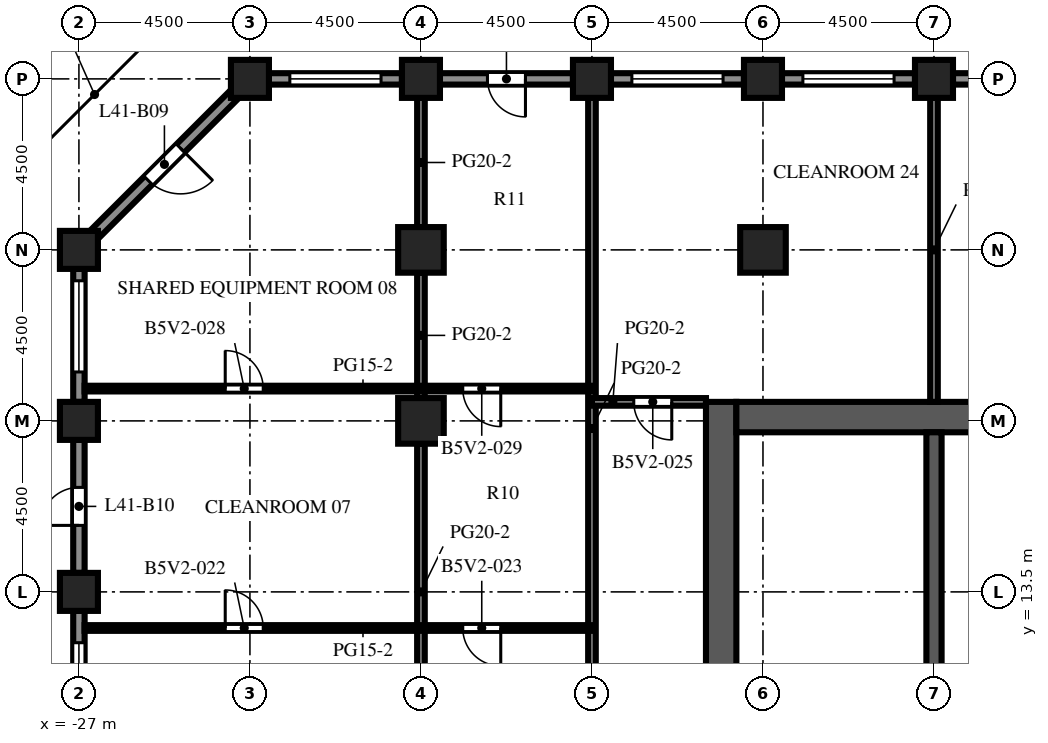
"""IFC4 building model, lengths in metres.
Left out: names, types, materials, properties, quantities, classifications, styles, units other than length and angle.
Written with IfcOpenShell. Run it as: python <this file> out.ifc"""

import sys

from ifc_helpers import new_model, si_unit, direction, frame, frame_2d, origin, origin_2d, place, context, subcontext, project, spatial, rectangle, extrude, element, fill, save


model = new_model("IFC4")
c1 = context("Model", 3, precision=1e-05, world=origin(), true_north=direction((0.0, 1.0)))
c2 = subcontext(c1, "Body", "Model", "MODEL_VIEW")
j1 = project(units=[si_unit("LENGTHUNIT", "METRE"), si_unit("PLANEANGLEUNIT", "RADIAN")], contexts=[c1])
p1 = place(None, origin())
s1 = spatial("IfcSite", under=j1, at=p1, CompositionType="ELEMENT")
p2 = place(p1, origin())
s2 = spatial("IfcBuilding", under=s1, at=p2, CompositionType="ELEMENT")
p3 = place(p2, frame((0.0, 0.0, 181.4)))
s3 = spatial("IfcBuildingStorey", under=s2, at=p3, CompositionType="ELEMENT", Elevation=181.4)
for number, where, z_axis, x_axis in (
    (1, (-27.0, 13.5, 0.0), (0.0, 0.0, 1.0), (1.0, 0.0, 0.0)),
    (2, (-27.0, 18.0, 0.0), (0.0, 0.0, 1.0), (1.0, 0.0, 0.0)),
    (3, (-27.0, 22.5, 0.0), (0.0, 0.0, 1.0), (1.0, 0.0, 0.0)),
    (4, (-22.5, 27.0, 0.0), (0.0, 0.0, 1.0), (1.0, 0.0, 0.0)),
    (5, (-18.0, 27.0, 0.0), (0.0, 0.0, 1.0), (1.0, 0.0, 0.0)),
    (6, (-13.5, 27.0, 0.0), (0.0, 0.0, 1.0), (1.0, 0.0, 0.0)),
    (7, (-9.0, 27.0, 0.0), (0.0, 0.0, 1.0), (1.0, 0.0, 0.0)),
    (8, (-4.5, 27.0, 0.0), (0.0, 0.0, 1.0), (1.0, 0.0, 0.0)),
):
    element("IfcColumn", number, at=place(p3, frame(where, z_axis=z_axis, x_axis=x_axis)), inside=s3, PredefinedType="COLUMN", context=c2, shape_type="SweptSolid", body=[
        extrude(rectangle(XDim=1.0, YDim=1.0, at=origin_2d()), origin(), (0.0, 0.0, 1.0), 4.1),
    ])
for number, where, z_axis, x_axis in (
    (9, (-18.0, 18.0, 0.0), (0.0, 0.0, 1.0), (1.0, 0.0, 0.0)),
    (10, (-18.0, 22.5, 0.0), (0.0, 0.0, 1.0), (1.0, 0.0, 0.0)),
    (11, (-9.0, 22.5, 0.0), (0.0, 0.0, 1.0), (1.0, 0.0, 0.0)),
):
    element("IfcColumn", number, at=place(p3, frame(where, z_axis=z_axis, x_axis=x_axis)), inside=s3, PredefinedType="COLUMN", context=c2, shape_type="SweptSolid", body=[
        extrude(rectangle(XDim=1.2, YDim=1.2, at=origin_2d()), origin(), (0.0, 0.0, 1.0), 4.1),
    ])
p4 = place(p3, frame((-10.1, -9.0, 0.0), z_axis=(0.0, 0.0, 1.0), x_axis=(0.0, 1.0, 0.0)))
e12 = element("IfcWall", 12, at=p4, inside=s3, PredefinedType="SHEAR", context=c2, shape_type="SweptSolid", body=[
    extrude(rectangle(XDim=27.5, YDim=0.8, at=frame_2d((13.75, 0.0))), origin(), (0.0, 0.0, 1.0), 4.1),
])
p5 = place(p4, frame((12.55, 0.0, 0.0)))
e13 = element("IfcOpeningElement", 13, at=p5, cuts=e12, PredefinedType="OPENING", context=c2, shape_type="SweptSolid", body=[
    extrude(rectangle(XDim=2.4, YDim=2.4, at=frame_2d((1.2, 1.2))), frame((0.0, 0.41, 0.0), z_axis=(0.0, -1.0, 0.0), x_axis=(1.0, 0.0, 0.0)), (0.0, 0.0, 1.0), 0.82),
])
p6 = place(p4, frame((6.825, 0.0, 0.0)))
e14 = element("IfcOpeningElement", 14, at=p6, cuts=e12, PredefinedType="OPENING", context=c2, shape_type="SweptSolid", body=[
    extrude(rectangle(XDim=1.2, YDim=2.1, at=frame_2d((0.6, 1.05))), frame((0.0, 0.41, 0.0), z_axis=(0.0, -1.0, 0.0), x_axis=(1.0, 0.0, 0.0)), (0.0, 0.0, 1.0), 0.82),
])
p7 = place(p4, frame((19.475, 0.0, 0.0)))
e15 = element("IfcOpeningElement", 15, at=p7, cuts=e12, PredefinedType="OPENING", context=c2, shape_type="SweptSolid", body=[
    extrude(rectangle(XDim=1.2, YDim=2.1, at=frame_2d((0.6, 1.05))), frame((0.0, 0.41, 0.0), z_axis=(0.0, -1.0, 0.0), x_axis=(1.0, 0.0, 0.0)), (0.0, 0.0, 1.0), 0.82),
])
p8 = place(p3, frame((-9.7, 18.1, 0.0), z_axis=(0.0, 0.0, 1.0), x_axis=(1.0, 0.0, 0.0)))
e16 = element("IfcWall", 16, at=p8, inside=s3, PredefinedType="SHEAR", context=c2, shape_type="SweptSolid", body=[
    extrude(rectangle(XDim=10.4, YDim=0.8, at=frame_2d((5.2, 0.0))), origin(), (0.0, 0.0, 1.0), 4.1),
])
p9 = place(p3, frame((-4.5, 10.2, 0.0), z_axis=(0.0, 0.0, 1.0), x_axis=(0.0, 1.0, 0.0)))
e17 = element("IfcWall", 17, at=p9, inside=s3, PredefinedType="SHEAR", context=c2, shape_type="SweptSolid", body=[
    extrude(rectangle(XDim=7.5, YDim=0.4, at=frame_2d((3.75, 0.0))), origin(), (0.0, 0.0, 1.0), 4.1),
])
p10 = place(p3, frame((-4.0, 27.0, 0.0), z_axis=(0.0, 0.0, 1.0), x_axis=(1.0, 0.0, 0.0)))
e18 = element("IfcWall", 18, at=p10, inside=s3, PredefinedType="SOLIDWALL", context=c2, shape_type="SweptSolid", body=[
    extrude(rectangle(XDim=3.5, YDim=0.3, at=frame_2d((1.75, 0.0))), origin(), (0.0, 0.0, 1.0), 2.7),
])
p11 = place(p10, frame((0.55, 0.0, 0.8)))
e19 = element("IfcOpeningElement", 19, at=p11, cuts=e18, PredefinedType="OPENING", context=c2, shape_type="SweptSolid", body=[
    extrude(rectangle(XDim=2.4, YDim=1.7, at=frame_2d((1.2, 0.85))), frame((0.0, 0.16, 0.0), z_axis=(0.0, -1.0, 0.0), x_axis=(1.0, 0.0, 0.0)), (0.0, 0.0, 1.0), 0.32),
])
p12 = place(p3, frame((-8.5, 27.0, 0.0), z_axis=(0.0, 0.0, 1.0), x_axis=(1.0, 0.0, 0.0)))
e20 = element("IfcWall", 20, at=p12, inside=s3, PredefinedType="SOLIDWALL", context=c2, shape_type="SweptSolid", body=[
    extrude(rectangle(XDim=3.5, YDim=0.3, at=frame_2d((1.75, 0.0))), origin(), (0.0, 0.0, 1.0), 2.7),
])
p13 = place(p12, frame((0.55, 0.0, 0.8)))
e21 = element("IfcOpeningElement", 21, at=p13, cuts=e20, PredefinedType="OPENING", context=c2, shape_type="SweptSolid", body=[
    extrude(rectangle(XDim=2.4, YDim=1.7, at=frame_2d((1.2, 0.85))), frame((0.0, 0.16, 0.0), z_axis=(0.0, -1.0, 0.0), x_axis=(1.0, 0.0, 0.0)), (0.0, 0.0, 1.0), 0.32),
])
p14 = place(p3, frame((-13.0, 27.0, 0.0), z_axis=(0.0, 0.0, 1.0), x_axis=(1.0, 0.0, 0.0)))
e22 = element("IfcWall", 22, at=p14, inside=s3, PredefinedType="SOLIDWALL", context=c2, shape_type="SweptSolid", body=[
    extrude(rectangle(XDim=3.5, YDim=0.3, at=frame_2d((1.75, 0.0))), origin(), (0.0, 0.0, 1.0), 2.7),
])
p15 = place(p14, frame((0.55, 0.0, 0.8)))
e23 = element("IfcOpeningElement", 23, at=p15, cuts=e22, PredefinedType="OPENING", context=c2, shape_type="SweptSolid", body=[
    extrude(rectangle(XDim=2.4, YDim=1.7, at=frame_2d((1.2, 0.85))), frame((0.0, 0.16, 0.0), z_axis=(0.0, -1.0, 0.0), x_axis=(1.0, 0.0, 0.0)), (0.0, 0.0, 1.0), 0.32),
])
p16 = place(p3, frame((-17.5, 27.0, 0.0), z_axis=(0.0, 0.0, 1.0), x_axis=(1.0, 0.0, 0.0)))
e24 = element("IfcWall", 24, at=p16, inside=s3, PredefinedType="SOLIDWALL", context=c2, shape_type="SweptSolid", body=[
    extrude(rectangle(XDim=3.5, YDim=0.3, at=frame_2d((1.75, 0.0))), origin(), (0.0, 0.0, 1.0), 2.7),
])
p17 = place(p16, frame((1.25, 0.0, 0.0)))
e25 = element("IfcOpeningElement", 25, at=p17, cuts=e24, PredefinedType="OPENING", context=c2, shape_type="SweptSolid", body=[
    extrude(rectangle(XDim=1.0, YDim=2.2, at=frame_2d((0.5, 1.1))), frame((0.0, 0.16, 0.0), z_axis=(0.0, -1.0, 0.0), x_axis=(1.0, 0.0, 0.0)), (0.0, 0.0, 1.0), 0.32),
])
p18 = place(p3, frame((-22.0, 27.0, 0.0), z_axis=(0.0, 0.0, 1.0), x_axis=(1.0, 0.0, 0.0)))
e26 = element("IfcWall", 26, at=p18, inside=s3, PredefinedType="SOLIDWALL", context=c2, shape_type="SweptSolid", body=[
    extrude(rectangle(XDim=3.5, YDim=0.3, at=frame_2d((1.75, 0.0))), origin(), (0.0, 0.0, 1.0), 2.7),
])
p19 = place(p18, frame((0.55, 0.0, 0.8)))
e27 = element("IfcOpeningElement", 27, at=p19, cuts=e26, PredefinedType="OPENING", context=c2, shape_type="SweptSolid", body=[
    extrude(rectangle(XDim=2.4, YDim=1.7, at=frame_2d((1.2, 0.85))), frame((0.0, 0.16, 0.0), z_axis=(0.0, -1.0, 0.0), x_axis=(1.0, 0.0, 0.0)), (0.0, 0.0, 1.0), 0.32),
])
p20 = place(p3, frame((-26.606, 22.894, 0.0), z_axis=(0.0, 0.0, 1.0), x_axis=(0.707106781187, 0.707106781187, 0.0)))
e28 = element("IfcWall", 28, at=p20, inside=s3, PredefinedType="SOLIDWALL", context=c2, shape_type="SweptSolid", body=[
    extrude(rectangle(XDim=5.25, YDim=0.3, at=frame_2d((2.625, 0.0))), origin(), (0.0, 0.0, 1.0), 2.7),
])
p21 = place(p20, frame((2.025, 0.0, 0.0)))
e29 = element("IfcOpeningElement", 29, at=p21, cuts=e28, PredefinedType="OPENING", context=c2, shape_type="SweptSolid", body=[
    extrude(rectangle(XDim=1.2, YDim=2.2, at=frame_2d((0.6, 1.1))), frame((0.0, 0.16, 0.0), z_axis=(0.0, -1.0, 0.0), x_axis=(1.0, 0.0, 0.0)), (0.0, 0.0, 1.0), 0.32),
])
p22 = place(p3, frame((-27.0, 18.5, 0.0), z_axis=(0.0, 0.0, 1.0), x_axis=(0.0, 1.0, 0.0)))
e30 = element("IfcWall", 30, at=p22, inside=s3, PredefinedType="SOLIDWALL", context=c2, shape_type="SweptSolid", body=[
    extrude(rectangle(XDim=3.5, YDim=0.3, at=frame_2d((1.75, 0.0))), origin(), (0.0, 0.0, 1.0), 2.7),
])
p23 = place(p22, frame((0.788, 0.0, 0.8)))
e31 = element("IfcOpeningElement", 31, at=p23, cuts=e30, PredefinedType="OPENING", context=c2, shape_type="SweptSolid", body=[
    extrude(rectangle(XDim=2.4, YDim=1.7, at=frame_2d((1.2, 0.85))), frame((0.0, 0.16, 0.0), z_axis=(0.0, -1.0, 0.0), x_axis=(1.0, 0.0, 0.0)), (0.0, 0.0, 1.0), 0.32),
])
p24 = place(p3, frame((-27.0, 14.0, 0.0), z_axis=(0.0, 0.0, 1.0), x_axis=(0.0, 1.0, 0.0)))
e32 = element("IfcWall", 32, at=p24, inside=s3, PredefinedType="SOLIDWALL", context=c2, shape_type="SweptSolid", body=[
    extrude(rectangle(XDim=3.5, YDim=0.3, at=frame_2d((1.75, 0.0))), origin(), (0.0, 0.0, 1.0), 2.7),
])
p25 = place(p24, frame((1.25, 0.0, 0.0)))
e33 = element("IfcOpeningElement", 33, at=p25, cuts=e32, PredefinedType="OPENING", context=c2, shape_type="SweptSolid", body=[
    extrude(rectangle(XDim=1.0, YDim=2.2, at=frame_2d((0.5, 1.1))), frame((0.0, 0.16, 0.0), z_axis=(0.0, -1.0, 0.0), x_axis=(1.0, 0.0, 0.0)), (0.0, 0.0, 1.0), 0.32),
])
p26 = place(p3, frame((-27.0, 9.5, 0.0), z_axis=(0.0, 0.0, 1.0), x_axis=(0.0, 1.0, 0.0)))
e34 = element("IfcWall", 34, at=p26, inside=s3, PredefinedType="SOLIDWALL", context=c2, shape_type="SweptSolid", body=[
    extrude(rectangle(XDim=3.5, YDim=0.3, at=frame_2d((1.75, 0.0))), origin(), (0.0, 0.0, 1.0), 2.7),
])
p27 = place(p26, frame((0.262, 0.0, 0.8)))
e35 = element("IfcOpeningElement", 35, at=p27, cuts=e34, PredefinedType="OPENING", context=c2, shape_type="SweptSolid", body=[
    extrude(rectangle(XDim=2.4, YDim=1.7, at=frame_2d((1.2, 0.85))), frame((0.0, 0.16, 0.0), z_axis=(0.0, -1.0, 0.0), x_axis=(1.0, 0.0, 0.0)), (0.0, 0.0, 1.0), 0.32),
])
for number, where, z_axis, x_axis in (
    (36, (-4.3, 12.45, 0.0), (0.0, 0.0, 1.0), (1.0, 0.0, 0.0)),
    (37, (-4.3, 15.075, 0.0), (0.0, 0.0, 1.0), (1.0, 0.0, 0.0)),
):
    element("IfcWall", number, at=place(p3, frame(where, z_axis=z_axis, x_axis=x_axis)), inside=s3, PredefinedType="PARTITIONING", context=c2, shape_type="SweptSolid", body=[
        extrude(rectangle(XDim=3.7, YDim=0.1, at=frame_2d((1.85, 0.0))), origin(), (0.0, 0.0, 1.0), 3.5),
    ])
p28 = place(p3, frame((-18.0, 9.6, 0.0), z_axis=(0.0, 0.0, 1.0), x_axis=(0.0, 1.0, 0.0)))
e38 = element("IfcWall", 38, at=p28, inside=s3, PredefinedType="PARTITIONING", context=c2, shape_type="SweptSolid", body=[
    extrude(rectangle(XDim=7.8, YDim=0.2, at=frame_2d((3.9, 0.0))), origin(), (0.0, 0.0, 1.0), 3.5),
])
p29 = place(p3, frame((-18.0, 18.6, 0.0), z_axis=(0.0, 0.0, 1.0), x_axis=(0.0, 1.0, 0.0)))
e39 = element("IfcWall", 39, at=p29, inside=s3, PredefinedType="PARTITIONING", context=c2, shape_type="SweptSolid", body=[
    extrude(rectangle(XDim=3.3, YDim=0.2, at=frame_2d((1.65, 0.0))), origin(), (0.0, 0.0, 1.0), 3.5),
])
p30 = place(p3, frame((-18.0, 23.1, 0.0), z_axis=(0.0, 0.0, 1.0), x_axis=(0.0, 1.0, 0.0)))
e40 = element("IfcWall", 40, at=p30, inside=s3, PredefinedType="PARTITIONING", context=c2, shape_type="SweptSolid", body=[
    extrude(rectangle(XDim=3.4, YDim=0.2, at=frame_2d((1.7, 0.0))), origin(), (0.0, 0.0, 1.0), 3.5),
])
p31 = place(p3, frame((-13.5, 6.25, 0.0), z_axis=(0.0, 0.0, 1.0), x_axis=(0.0, 1.0, 0.0)))
e41 = element("IfcWall", 41, at=p31, inside=s3, PredefinedType="PARTITIONING", context=c2, shape_type="SweptSolid", body=[
    extrude(rectangle(XDim=20.25, YDim=0.2, at=frame_2d((10.125, 0.0))), origin(), (0.0, 0.0, 1.0), 3.5),
])
p32 = place(p31, frame((1.85, 0.0, 0.0)))
e42 = element("IfcOpeningElement", 42, at=p32, cuts=e41, PredefinedType="OPENING", context=c2, shape_type="SweptSolid", body=[
    extrude(rectangle(XDim=1.0, YDim=2.1, at=frame_2d((0.5, 1.05))), frame((0.0, 0.11, 0.0), z_axis=(0.0, -1.0, 0.0), x_axis=(1.0, 0.0, 0.0)), (0.0, 0.0, 1.0), 0.22),
])
p33 = place(p3, frame((-4.5, 18.5, 0.0), z_axis=(0.0, 0.0, 1.0), x_axis=(0.0, 1.0, 0.0)))
e43 = element("IfcWall", 43, at=p33, inside=s3, PredefinedType="PARTITIONING", context=c2, shape_type="SweptSolid", body=[
    extrude(rectangle(XDim=8.0, YDim=0.2, at=frame_2d((4.0, 0.0))), origin(), (0.0, 0.0, 1.0), 3.5),
])
p34 = place(p3, frame((-26.85, 12.55, 0.0), z_axis=(0.0, 0.0, 1.0), x_axis=(1.0, 0.0, 0.0)))
e44 = element("IfcWall", 44, at=p34, inside=s3, PredefinedType="PARTITIONING", context=c2, shape_type="SweptSolid", body=[
    extrude(rectangle(XDim=13.35, YDim=0.15, at=frame_2d((6.675, 0.0))), origin(), (0.0, 0.0, 1.0), 3.5),
])
p35 = place(p34, frame((3.7, 0.0, 0.0)))
e45 = element("IfcOpeningElement", 45, at=p35, cuts=e44, PredefinedType="OPENING", context=c2, shape_type="SweptSolid", body=[
    extrude(rectangle(XDim=1.0, YDim=2.1, at=frame_2d((0.5, 1.05))), frame((0.0, 0.085, 0.0), z_axis=(0.0, -1.0, 0.0), x_axis=(1.0, 0.0, 0.0)), (0.0, 0.0, 1.0), 0.17),
])
p36 = place(p34, frame((9.95, 0.0, 0.0)))
e46 = element("IfcOpeningElement", 46, at=p36, cuts=e44, PredefinedType="OPENING", context=c2, shape_type="SweptSolid", body=[
    extrude(rectangle(XDim=1.0, YDim=2.1, at=frame_2d((0.5, 1.05))), frame((0.0, 0.085, 0.0), z_axis=(0.0, -1.0, 0.0), x_axis=(1.0, 0.0, 0.0)), (0.0, 0.0, 1.0), 0.17),
])
p37 = place(p3, frame((-13.5, 18.5, 0.0), z_axis=(0.0, 0.0, 1.0), x_axis=(1.0, 0.0, 0.0)))
e47 = element("IfcWall", 47, at=p37, inside=s3, PredefinedType="PARTITIONING", context=c2, shape_type="SweptSolid", body=[
    extrude(rectangle(XDim=3.0, YDim=0.2, at=frame_2d((1.5, 0.0))), origin(), (0.0, 0.0, 1.0), 3.5),
])
p38 = place(p37, frame((1.1, 0.0, 0.0)))
e48 = element("IfcOpeningElement", 48, at=p38, cuts=e47, PredefinedType="OPENING", context=c2, shape_type="SweptSolid", body=[
    extrude(rectangle(XDim=1.0, YDim=2.1, at=frame_2d((0.5, 1.05))), frame((0.0, 0.11, 0.0), z_axis=(0.0, -1.0, 0.0), x_axis=(1.0, 0.0, 0.0)), (0.0, 0.0, 1.0), 0.22),
])
p39 = place(p3, frame((-26.85, 18.85, 0.0), z_axis=(0.0, 0.0, 1.0), x_axis=(1.0, 0.0, 0.0)))
e49 = element("IfcWall", 49, at=p39, inside=s3, PredefinedType="PARTITIONING", context=c2, shape_type="SweptSolid", body=[
    extrude(rectangle(XDim=13.35, YDim=0.15, at=frame_2d((6.675, 0.0))), origin(), (0.0, 0.0, 1.0), 3.5),
])
p40 = place(p39, frame((3.7, 0.0, 0.0)))
e50 = element("IfcOpeningElement", 50, at=p40, cuts=e49, PredefinedType="OPENING", context=c2, shape_type="SweptSolid", body=[
    extrude(rectangle(XDim=1.0, YDim=2.1, at=frame_2d((0.5, 1.05))), frame((0.0, 0.085, 0.0), z_axis=(0.0, -1.0, 0.0), x_axis=(1.0, 0.0, 0.0)), (0.0, 0.0, 1.0), 0.17),
])
p41 = place(p39, frame((9.95, 0.0, 0.0)))
e51 = element("IfcOpeningElement", 51, at=p41, cuts=e49, PredefinedType="OPENING", context=c2, shape_type="SweptSolid", body=[
    extrude(rectangle(XDim=1.0, YDim=2.1, at=frame_2d((0.5, 1.05))), frame((0.0, 0.085, 0.0), z_axis=(0.0, -1.0, 0.0), x_axis=(1.0, 0.0, 0.0)), (0.0, 0.0, 1.0), 0.17),
])
p42 = place(p13, origin())
e52 = element("IfcWindow", 52, at=p42, inside=s3, PartitioningType="SINGLE_PANEL", PredefinedType="WINDOW", context=c2, shape_type="SweptSolid", body=[
    extrude(rectangle(XDim=2.4, YDim=1.7, at=frame_2d((1.2, 0.85))), frame((0.0, 0.03, 0.0), z_axis=(0.0, -1.0, 0.0), x_axis=(1.0, 0.0, 0.0)), (0.0, 0.0, 1.0), 0.06),
])
fill(e21, e52)
p43 = place(p15, origin())
e53 = element("IfcWindow", 53, at=p43, inside=s3, PartitioningType="SINGLE_PANEL", PredefinedType="WINDOW", context=c2, shape_type="SweptSolid", body=[
    extrude(rectangle(XDim=2.4, YDim=1.7, at=frame_2d((1.2, 0.85))), frame((0.0, 0.03, 0.0), z_axis=(0.0, -1.0, 0.0), x_axis=(1.0, 0.0, 0.0)), (0.0, 0.0, 1.0), 0.06),
])
fill(e23, e53)
p44 = place(p17, origin())
e54 = element("IfcDoor", 54, at=p44, inside=s3, OperationType="SINGLE_SWING_RIGHT", PredefinedType="DOOR", context=c2, shape_type="SweptSolid", body=[
    extrude(rectangle(XDim=1.0, YDim=2.2, at=frame_2d((0.5, 1.1))), frame((0.0, 0.025, 0.0), z_axis=(0.0, -1.0, 0.0), x_axis=(1.0, 0.0, 0.0)), (0.0, 0.0, 1.0), 0.05),
])
fill(e25, e54)
p45 = place(p19, origin())
e55 = element("IfcWindow", 55, at=p45, inside=s3, PartitioningType="SINGLE_PANEL", PredefinedType="WINDOW", context=c2, shape_type="SweptSolid", body=[
    extrude(rectangle(XDim=2.4, YDim=1.7, at=frame_2d((1.2, 0.85))), frame((0.0, 0.03, 0.0), z_axis=(0.0, -1.0, 0.0), x_axis=(1.0, 0.0, 0.0)), (0.0, 0.0, 1.0), 0.06),
])
fill(e27, e55)
p46 = place(p21, origin())
e56 = element("IfcDoor", 56, at=p46, inside=s3, OperationType="SINGLE_SWING_RIGHT", PredefinedType="DOOR", context=c2, shape_type="SweptSolid", body=[
    extrude(rectangle(XDim=1.2, YDim=2.2, at=frame_2d((0.6, 1.1))), frame((0.0, 0.025, 0.0), z_axis=(0.0, -1.0, 0.0), x_axis=(1.0, 0.0, 0.0)), (0.0, 0.0, 1.0), 0.05),
])
fill(e29, e56)
p47 = place(p23, origin())
e57 = element("IfcWindow", 57, at=p47, inside=s3, PartitioningType="SINGLE_PANEL", PredefinedType="WINDOW", context=c2, shape_type="SweptSolid", body=[
    extrude(rectangle(XDim=2.4, YDim=1.7, at=frame_2d((1.2, 0.85))), frame((0.0, 0.03, 0.0), z_axis=(0.0, -1.0, 0.0), x_axis=(1.0, 0.0, 0.0)), (0.0, 0.0, 1.0), 0.06),
])
fill(e31, e57)
p48 = place(p25, origin())
e58 = element("IfcDoor", 58, at=p48, inside=s3, OperationType="SINGLE_SWING_LEFT", PredefinedType="DOOR", context=c2, shape_type="SweptSolid", body=[
    extrude(rectangle(XDim=1.0, YDim=2.2, at=frame_2d((0.5, 1.1))), frame((0.0, 0.025, 0.0), z_axis=(0.0, -1.0, 0.0), x_axis=(1.0, 0.0, 0.0)), (0.0, 0.0, 1.0), 0.05),
])
fill(e33, e58)
p49 = place(p27, origin())
e59 = element("IfcWindow", 59, at=p49, inside=s3, PartitioningType="SINGLE_PANEL", PredefinedType="WINDOW", context=c2, shape_type="SweptSolid", body=[
    extrude(rectangle(XDim=2.4, YDim=1.7, at=frame_2d((1.2, 0.85))), frame((0.0, 0.03, 0.0), z_axis=(0.0, -1.0, 0.0), x_axis=(1.0, 0.0, 0.0)), (0.0, 0.0, 1.0), 0.06),
])
fill(e35, e59)
p50 = place(p7, origin())
e60 = element("IfcDoor", 60, at=p50, inside=s3, OperationType="SINGLE_SWING_LEFT", PredefinedType="DOOR", context=c2, shape_type="SweptSolid", body=[
    extrude(rectangle(XDim=1.2, YDim=2.1, at=frame_2d((0.6, 1.05))), frame((0.0, 0.025, 0.0), z_axis=(0.0, -1.0, 0.0), x_axis=(1.0, 0.0, 0.0)), (0.0, 0.0, 1.0), 0.05),
])
fill(e15, e60)
p51 = place(p35, origin())
e61 = element("IfcDoor", 61, at=p51, inside=s3, OperationType="SINGLE_SWING_LEFT", PredefinedType="DOOR", context=c2, shape_type="SweptSolid", body=[
    extrude(rectangle(XDim=1.0, YDim=2.1, at=frame_2d((0.5, 1.05))), frame((0.0, 0.025, 0.0), z_axis=(0.0, -1.0, 0.0), x_axis=(1.0, 0.0, 0.0)), (0.0, 0.0, 1.0), 0.05),
])
fill(e45, e61)
p52 = place(p36, origin())
e62 = element("IfcDoor", 62, at=p52, inside=s3, OperationType="SINGLE_SWING_RIGHT", PredefinedType="DOOR", context=c2, shape_type="SweptSolid", body=[
    extrude(rectangle(XDim=1.0, YDim=2.1, at=frame_2d((0.5, 1.05))), frame((0.0, 0.025, 0.0), z_axis=(0.0, -1.0, 0.0), x_axis=(1.0, 0.0, 0.0)), (0.0, 0.0, 1.0), 0.05),
])
fill(e46, e62)
p53 = place(p38, origin())
e63 = element("IfcDoor", 63, at=p53, inside=s3, OperationType="SINGLE_SWING_RIGHT", PredefinedType="DOOR", context=c2, shape_type="SweptSolid", body=[
    extrude(rectangle(XDim=1.0, YDim=2.1, at=frame_2d((0.5, 1.05))), frame((0.0, 0.025, 0.0), z_axis=(0.0, -1.0, 0.0), x_axis=(1.0, 0.0, 0.0)), (0.0, 0.0, 1.0), 0.05),
])
fill(e48, e63)
p54 = place(p40, origin())
e64 = element("IfcDoor", 64, at=p54, inside=s3, OperationType="SINGLE_SWING_LEFT", PredefinedType="DOOR", context=c2, shape_type="SweptSolid", body=[
    extrude(rectangle(XDim=1.0, YDim=2.1, at=frame_2d((0.5, 1.05))), frame((0.0, 0.025, 0.0), z_axis=(0.0, -1.0, 0.0), x_axis=(1.0, 0.0, 0.0)), (0.0, 0.0, 1.0), 0.05),
])
fill(e50, e64)
p55 = place(p41, origin())
e65 = element("IfcDoor", 65, at=p55, inside=s3, OperationType="SINGLE_SWING_RIGHT", PredefinedType="DOOR", context=c2, shape_type="SweptSolid", body=[
    extrude(rectangle(XDim=1.0, YDim=2.1, at=frame_2d((0.5, 1.05))), frame((0.0, 0.025, 0.0), z_axis=(0.0, -1.0, 0.0), x_axis=(1.0, 0.0, 0.0)), (0.0, 0.0, 1.0), 0.05),
])
fill(e51, e65)
save(model, sys.argv[1])
